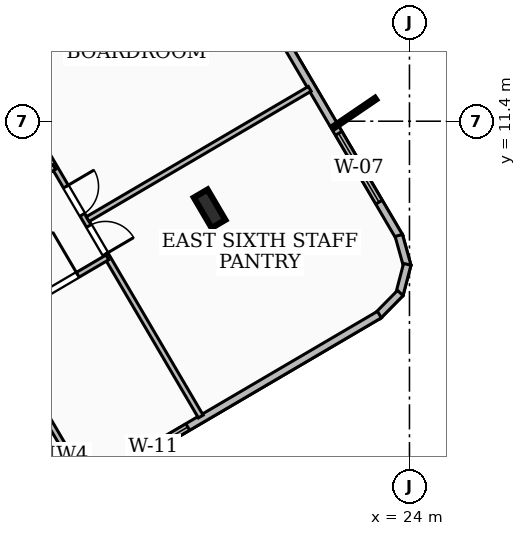
"""IFC4 building model, lengths in metres.
Left out: names, types, materials, properties, quantities, classifications, styles, units other than length and angle.
Written with IfcOpenShell. Run it as: python <this file> out.ifc"""

import sys

from ifc_helpers import new_model, si_unit, direction, frame, frame_2d, origin, origin_2d, place, context, subcontext, project, spatial, rectangle, i_section, extrude, element, fill, save


model = new_model("IFC4")
c1 = context("Model", 3, precision=1e-05, world=origin(), true_north=direction((0.0, 1.0)))
c2 = subcontext(c1, "Body", "Model", "MODEL_VIEW")
j1 = project(units=[si_unit("LENGTHUNIT", "METRE"), si_unit("PLANEANGLEUNIT", "RADIAN")], contexts=[c1])
p1 = place(None, origin())
s1 = spatial("IfcSite", under=j1, at=p1, CompositionType="ELEMENT")
p2 = place(p1, origin())
s2 = spatial("IfcBuilding", under=s1, at=p2, CompositionType="ELEMENT")
p3 = place(p2, frame((0.0, 0.0, 212.04)))
s3 = spatial("IfcBuildingStorey", under=s2, at=p3, CompositionType="ELEMENT", Elevation=212.04)
p4 = place(p3, frame((18.741, 9.097, 0.0), z_axis=(0.0, 0.0, 1.0), x_axis=(0.862513669207, 0.506033764121, 0.0)))
e1 = element("IfcColumn", 1, at=p4, inside=s3, PredefinedType="COLUMN", context=c2, shape_type="SweptSolid", body=[
    extrude(i_section(OverallWidth=0.418, OverallDepth=0.927, WebThickness=0.019, FlangeThickness=0.032, at=origin_2d()), origin(), (0.0, 0.0, 1.0), 3.42),
])
p5 = place(p3, frame((18.869, 16.65, 0.0), z_axis=(0.0, 0.0, 1.0), x_axis=(0.505984418435, -0.862542618252, 0.0)))
e2 = element("IfcWall", 2, at=p5, inside=s3, PredefinedType="SOLIDWALL", context=c2, shape_type="SweptSolid", body=[
    extrude(rectangle(XDim=9.625, YDim=0.2, at=frame_2d((4.812, 0.0))), origin(), (0.0, 0.0, 1.0), 3.16),
])
p6 = place(p5, frame((6.457, 0.0, 0.85)))
e3 = element("IfcOpeningElement", 3, at=p6, cuts=e2, PredefinedType="OPENING", context=c2, shape_type="SweptSolid", body=[
    extrude(rectangle(XDim=2.1, YDim=1.8, at=frame_2d((1.05, 0.9))), frame((0.0, 0.11, 0.0), z_axis=(0.0, -1.0, 0.0), x_axis=(1.0, 0.0, 0.0)), (0.0, 0.0, 1.0), 0.22),
])
p7 = place(p3, frame((23.719, 8.394, 0.0), z_axis=(0.0, 0.0, 1.0), x_axis=(0.267253449678, -0.963626272803, 0.0)))
e4 = element("IfcWall", 4, at=p7, inside=s3, PredefinedType="SOLIDWALL", context=c2, shape_type="SweptSolid", body=[
    extrude(rectangle(XDim=0.839, YDim=0.2, at=frame_2d((0.419, 0.0))), origin(), (0.0, 0.0, 1.0), 3.16),
])
p8 = place(p3, frame((23.942, 7.634, 0.0), z_axis=(0.0, 0.0, 1.0), x_axis=(-0.252494280442, -0.967598386906, 0.0)))
e5 = element("IfcWall", 5, at=p8, inside=s3, PredefinedType="SOLIDWALL", context=c2, shape_type="SweptSolid", body=[
    extrude(rectangle(XDim=0.824, YDim=0.2, at=frame_2d((0.412, 0.0))), origin(), (0.0, 0.0, 1.0), 3.16),
])
p9 = place(p3, frame((23.758, 6.879, 0.0), z_axis=(0.0, 0.0, 1.0), x_axis=(-0.701851868682, -0.712322928472, 0.0)))
e6 = element("IfcWall", 6, at=p9, inside=s3, PredefinedType="SOLIDWALL", context=c2, shape_type="SweptSolid", body=[
    extrude(rectangle(XDim=0.839, YDim=0.2, at=frame_2d((0.42, 0.0))), origin(), (0.0, 0.0, 1.0), 3.16),
])
p10 = place(p3, frame((23.209, 6.312, 0.0), z_axis=(0.0, 0.0, 1.0), x_axis=(-0.862602827395, -0.505881766988, 0.0)))
e7 = element("IfcWall", 7, at=p10, inside=s3, PredefinedType="SOLIDWALL", context=c2, shape_type="SweptSolid", body=[
    extrude(rectangle(XDim=8.842, YDim=0.2, at=frame_2d((4.421, 0.0))), origin(), (0.0, 0.0, 1.0), 3.16),
])
p11 = place(p10, frame((5.847, 0.0, 0.85)))
e8 = element("IfcOpeningElement", 8, at=p11, cuts=e7, PredefinedType="OPENING", context=c2, shape_type="SweptSolid", body=[
    extrude(rectangle(XDim=2.1, YDim=1.6, at=frame_2d((1.05, 0.8))), frame((0.0, 0.11, 0.0), z_axis=(0.0, -1.0, 0.0), x_axis=(1.0, 0.0, 0.0)), (0.0, 0.0, 1.0), 0.22),
])
p12 = place(p3, frame((17.041, -0.807, 0.0), z_axis=(0.0, 0.0, 1.0), x_axis=(-0.505943324238, 0.862566723598, 0.0)))
e9 = element("IfcWall", 9, at=p12, inside=s3, PredefinedType="PARTITIONING", context=c2, shape_type="SweptSolid", body=[
    extrude(rectangle(XDim=7.949, YDim=0.145, at=frame_2d((3.975, 0.0))), origin(), (0.0, 0.0, 1.0), 3.16),
])
p13 = place(p3, frame((14.654, 10.198, 0.0), z_axis=(0.0, 0.0, 1.0), x_axis=(-0.862375516706, -0.506269165747, 0.0)))
e10 = element("IfcWall", 10, at=p13, inside=s3, PredefinedType="PARTITIONING", context=c2, shape_type="SweptSolid", body=[
    extrude(rectangle(XDim=3.51, YDim=0.145, at=frame_2d((1.755, 0.0))), origin(), (0.0, 0.0, 1.0), 2.53),
])
p14 = place(p13, frame((1.305, 0.0, 0.0)))
e11 = element("IfcOpeningElement", 11, at=p14, cuts=e10, PredefinedType="OPENING", context=c2, shape_type="SweptSolid", body=[
    extrude(rectangle(XDim=1.3, YDim=2.1, at=frame_2d((0.65, 1.05))), frame((0.0, 0.083, 0.0), z_axis=(0.0, -1.0, 0.0), x_axis=(1.0, 0.0, 0.0)), (0.0, 0.0, 1.0), 0.165),
])
p15 = place(p3, frame((13.024, 6.041, 0.0), z_axis=(0.0, 0.0, 1.0), x_axis=(0.862527334663, 0.506010471195, 0.0)))
e12 = element("IfcWall", 12, at=p15, inside=s3, PredefinedType="PARTITIONING", context=c2, shape_type="SweptSolid", body=[
    extrude(rectangle(XDim=3.51, YDim=0.145, at=frame_2d((1.755, 0.0))), origin(), (0.0, 0.0, 1.0), 3.16),
])
p16 = place(p15, frame((1.305, 0.0, 0.0)))
e13 = element("IfcOpeningElement", 13, at=p16, cuts=e12, PredefinedType="OPENING", context=c2, shape_type="SweptSolid", body=[
    extrude(rectangle(XDim=1.3, YDim=2.1, at=frame_2d((0.65, 1.05))), frame((0.0, 0.083, 0.0), z_axis=(0.0, -1.0, 0.0), x_axis=(1.0, 0.0, 0.0)), (0.0, 0.0, 1.0), 0.165),
])
p17 = place(p3, frame((15.531, 8.822, 0.0), z_axis=(0.0, 0.0, 1.0), x_axis=(0.862494081005, 0.506067149923, 0.0)))
e14 = element("IfcWall", 14, at=p17, inside=s3, PredefinedType="PARTITIONING", context=c2, shape_type="SweptSolid", body=[
    extrude(rectangle(XDim=6.776, YDim=0.145, at=frame_2d((3.388, 0.0))), origin(), (0.0, 0.0, 1.0), 2.53),
])
p18 = place(p3, frame((12.198, 14.385, 0.0), z_axis=(0.0, 0.0, 1.0), x_axis=(0.506037527975, -0.862511460956, 0.0)))
e15 = element("IfcWall", 15, at=p18, inside=s3, PredefinedType="PARTITIONING", context=c2, shape_type="SweptSolid", body=[
    extrude(rectangle(XDim=12.469, YDim=0.145, at=frame_2d((6.235, 0.0))), origin(), (0.0, 0.0, 1.0), 2.53),
])
p19 = place(p18, frame((6.655, 0.0, 0.0)))
e16 = element("IfcOpeningElement", 16, at=p19, cuts=e15, PredefinedType="OPENING", context=c2, shape_type="SweptSolid", body=[
    extrude(rectangle(XDim=0.86, YDim=2.04, at=frame_2d((0.43, 1.02))), frame((0.0, 0.083, 0.0), z_axis=(0.0, -1.0, 0.0), x_axis=(1.0, 0.0, 0.0)), (0.0, 0.0, 1.0), 0.165),
])
p20 = place(p18, frame((5.455, 0.0, 0.0)))
e17 = element("IfcOpeningElement", 17, at=p20, cuts=e15, PredefinedType="OPENING", context=c2, shape_type="SweptSolid", body=[
    extrude(rectangle(XDim=0.86, YDim=2.04, at=frame_2d((0.43, 1.02))), frame((0.0, 0.083, 0.0), z_axis=(0.0, -1.0, 0.0), x_axis=(1.0, 0.0, 0.0)), (0.0, 0.0, 1.0), 0.165),
])
p21 = place(p6, origin())
e18 = element("IfcWindow", 18, at=p21, inside=s3, PartitioningType="SINGLE_PANEL", PredefinedType="WINDOW", context=c2, shape_type="SweptSolid", body=[
    extrude(rectangle(XDim=2.1, YDim=1.8, at=frame_2d((1.05, 0.9))), frame((0.0, 0.03, 0.0), z_axis=(0.0, -1.0, 0.0), x_axis=(1.0, 0.0, 0.0)), (0.0, 0.0, 1.0), 0.06),
])
fill(e3, e18)
p22 = place(p11, origin())
e19 = element("IfcWindow", 19, at=p22, inside=s3, PartitioningType="SINGLE_PANEL", PredefinedType="WINDOW", context=c2, shape_type="SweptSolid", body=[
    extrude(rectangle(XDim=2.1, YDim=1.6, at=frame_2d((1.05, 0.8))), frame((0.0, 0.03, 0.0), z_axis=(0.0, -1.0, 0.0), x_axis=(1.0, 0.0, 0.0)), (0.0, 0.0, 1.0), 0.06),
])
fill(e8, e19)
p23 = place(p16, origin())
e20 = element("IfcDoor", 20, at=p23, inside=s3, OperationType="SINGLE_SWING_RIGHT", PredefinedType="DOOR", context=c2, shape_type="SweptSolid", body=[
    extrude(rectangle(XDim=1.3, YDim=2.1, at=frame_2d((0.65, 1.05))), frame((0.0, 0.025, 0.0), z_axis=(0.0, -1.0, 0.0), x_axis=(1.0, 0.0, 0.0)), (0.0, 0.0, 1.0), 0.05),
])
fill(e13, e20)
p24 = place(p19, origin())
e21 = element("IfcDoor", 21, at=p24, inside=s3, OperationType="SINGLE_SWING_RIGHT", PredefinedType="DOOR", context=c2, shape_type="SweptSolid", body=[
    extrude(rectangle(XDim=0.86, YDim=2.04, at=frame_2d((0.43, 1.02))), frame((0.0, 0.025, 0.0), z_axis=(0.0, -1.0, 0.0), x_axis=(1.0, 0.0, 0.0)), (0.0, 0.0, 1.0), 0.05),
])
fill(e16, e21)
p25 = place(p20, origin())
e22 = element("IfcDoor", 22, at=p25, inside=s3, OperationType="SINGLE_SWING_LEFT", PredefinedType="DOOR", context=c2, shape_type="SweptSolid", body=[
    extrude(rectangle(XDim=0.86, YDim=2.04, at=frame_2d((0.43, 1.02))), frame((0.0, 0.025, 0.0), z_axis=(0.0, -1.0, 0.0), x_axis=(1.0, 0.0, 0.0)), (0.0, 0.0, 1.0), 0.05),
])
fill(e17, e22)
save(model, sys.argv[1])
